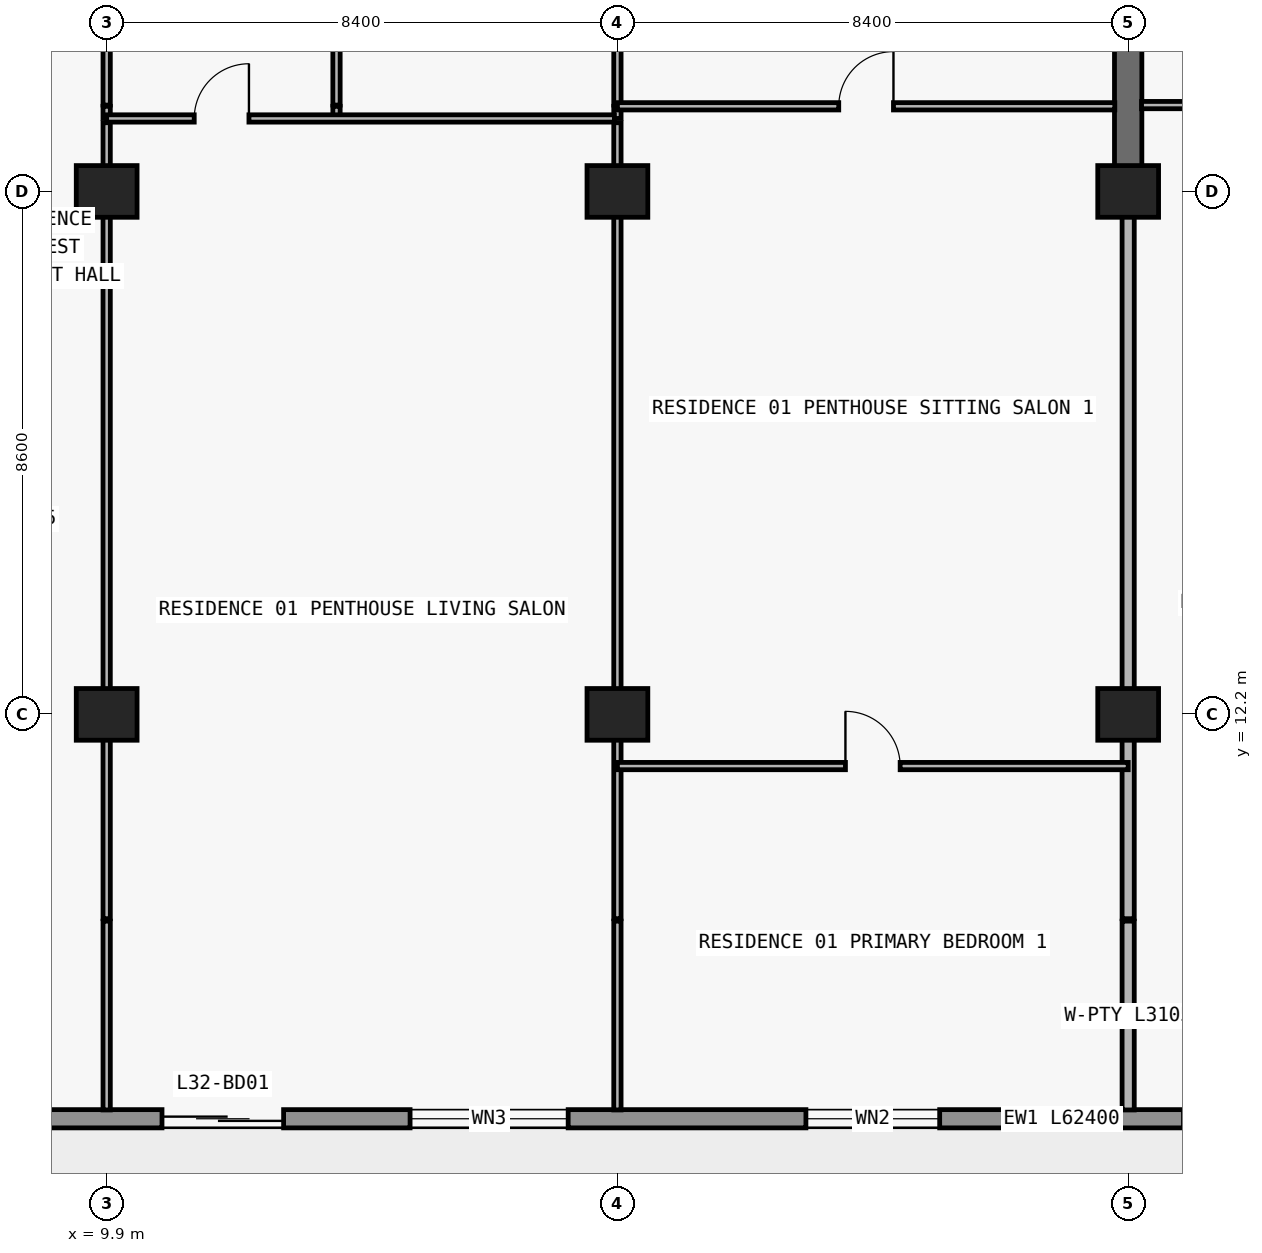
"""IFC4 building model, lengths in metres.
Left out: names, types, materials, properties, quantities, classifications, styles, units other than length and angle.
Written with IfcOpenShell. Run it as: python <this file> out.ifc"""

import sys

from ifc_helpers import new_model, si_unit, direction, frame, frame_2d, origin, origin_2d, place, context, subcontext, project, spatial, rectangle, extrude, element, fill, save


model = new_model("IFC4")
c1 = context("Model", 3, precision=1e-05, world=origin(), true_north=direction((0.0, 1.0)))
c2 = subcontext(c1, "Body", "Model", "MODEL_VIEW")
j1 = project(units=[si_unit("LENGTHUNIT", "METRE"), si_unit("PLANEANGLEUNIT", "RADIAN")], contexts=[c1])
p1 = place(None, origin())
s1 = spatial("IfcSite", under=j1, at=p1, CompositionType="ELEMENT")
p2 = place(p1, origin())
s2 = spatial("IfcBuilding", under=s1, at=p2, CompositionType="ELEMENT")
p3 = place(p2, frame((0.0, 0.0, 119.1)))
s3 = spatial("IfcBuildingStorey", under=s2, at=p3, CompositionType="ELEMENT", Elevation=119.1)
for number, where, z_axis, x_axis in (
    (1, (9.9, 12.2, 0.0), (0.0, 0.0, 1.0), (1.0, 0.0, 0.0)),
    (2, (18.3, 12.2, 0.0), (0.0, 0.0, 1.0), (1.0, 0.0, 0.0)),
    (3, (26.7, 12.2, 0.0), (0.0, 0.0, 1.0), (1.0, 0.0, 0.0)),
    (4, (9.9, 20.8, 0.0), (0.0, 0.0, 1.0), (1.0, 0.0, 0.0)),
    (5, (18.3, 20.8, 0.0), (0.0, 0.0, 1.0), (1.0, 0.0, 0.0)),
    (6, (26.7, 20.8, 0.0), (0.0, 0.0, 1.0), (1.0, 0.0, 0.0)),
):
    element("IfcColumn", number, at=place(p3, frame(where, z_axis=z_axis, x_axis=x_axis)), inside=s3, PredefinedType="COLUMN", context=c2, shape_type="SweptSolid", body=[
        extrude(rectangle(XDim=1.0, YDim=0.85, at=origin_2d()), origin(), (0.0, 0.0, 1.0), 3.05),
    ])
p4 = place(p3, frame((26.7, 20.8, 0.0), z_axis=(0.0, 0.0, 1.0), x_axis=(0.0, 1.0, 0.0)))
e7 = element("IfcWall", 7, at=p4, inside=s3, PredefinedType="SHEAR", context=c2, shape_type="SweptSolid", body=[
    extrude(rectangle(XDim=8.6, YDim=0.45, at=frame_2d((4.3, 0.0))), origin(), (0.0, 0.0, 1.0), 3.05),
])
p5 = place(p3, frame((70.1, 5.55, 0.0), z_axis=(0.0, 0.0, 1.0), x_axis=(-1.0, 0.0, 0.0)))
e8 = element("IfcWall", 8, at=p5, inside=s3, PredefinedType="STANDARD", context=c2, shape_type="SweptSolid", body=[
    extrude(rectangle(XDim=62.4, YDim=0.3, at=frame_2d((31.2, 0.0))), origin(), (0.0, 0.0, 1.0), 3.05),
])
p6 = place(p5, frame((57.29, 0.0, 0.0)))
e9 = element("IfcOpeningElement", 9, at=p6, cuts=e8, PredefinedType="OPENING", context=c2, shape_type="SweptSolid", body=[
    extrude(rectangle(XDim=2.0, YDim=2.3, at=frame_2d((1.0, 1.15))), frame((0.0, 0.16, 0.0), z_axis=(0.0, -1.0, 0.0), x_axis=(1.0, 0.0, 0.0)), (0.0, 0.0, 1.0), 0.32),
])
p7 = place(p5, frame((52.61, 0.0, 0.65)))
e10 = element("IfcOpeningElement", 10, at=p7, cuts=e8, PredefinedType="OPENING", context=c2, shape_type="SweptSolid", body=[
    extrude(rectangle(XDim=2.6, YDim=1.85, at=frame_2d((1.3, 0.925))), frame((0.0, 0.16, 0.0), z_axis=(0.0, -1.0, 0.0), x_axis=(1.0, 0.0, 0.0)), (0.0, 0.0, 1.0), 0.32),
])
p8 = place(p5, frame((46.5, 0.0, 0.85)))
e11 = element("IfcOpeningElement", 11, at=p8, cuts=e8, PredefinedType="OPENING", context=c2, shape_type="SweptSolid", body=[
    extrude(rectangle(XDim=2.2, YDim=1.55, at=frame_2d((1.1, 0.775))), frame((0.0, 0.16, 0.0), z_axis=(0.0, -1.0, 0.0), x_axis=(1.0, 0.0, 0.0)), (0.0, 0.0, 1.0), 0.32),
])
p9 = place(p5, frame((40.49, 0.0, 0.0)))
e12 = element("IfcOpeningElement", 12, at=p9, cuts=e8, PredefinedType="OPENING", context=c2, shape_type="SweptSolid", body=[
    extrude(rectangle(XDim=2.0, YDim=2.3, at=frame_2d((1.0, 1.15))), frame((0.0, 0.16, 0.0), z_axis=(0.0, -1.0, 0.0), x_axis=(1.0, 0.0, 0.0)), (0.0, 0.0, 1.0), 0.32),
])
p10 = place(p5, frame((35.81, 0.0, 0.65)))
e13 = element("IfcOpeningElement", 13, at=p10, cuts=e8, PredefinedType="OPENING", context=c2, shape_type="SweptSolid", body=[
    extrude(rectangle(XDim=2.6, YDim=1.85, at=frame_2d((1.3, 0.925))), frame((0.0, 0.16, 0.0), z_axis=(0.0, -1.0, 0.0), x_axis=(1.0, 0.0, 0.0)), (0.0, 0.0, 1.0), 0.32),
])
p11 = place(p5, frame((30.1, 0.0, 0.85)))
e14 = element("IfcOpeningElement", 14, at=p11, cuts=e8, PredefinedType="OPENING", context=c2, shape_type="SweptSolid", body=[
    extrude(rectangle(XDim=2.2, YDim=1.55, at=frame_2d((1.1, 0.775))), frame((0.0, 0.16, 0.0), z_axis=(0.0, -1.0, 0.0), x_axis=(1.0, 0.0, 0.0)), (0.0, 0.0, 1.0), 0.32),
])
p12 = place(p5, frame((24.426, 0.0, 0.0)))
e15 = element("IfcOpeningElement", 15, at=p12, cuts=e8, PredefinedType="OPENING", context=c2, shape_type="SweptSolid", body=[
    extrude(rectangle(XDim=2.0, YDim=2.3, at=frame_2d((1.0, 1.15))), frame((0.0, 0.16, 0.0), z_axis=(0.0, -1.0, 0.0), x_axis=(1.0, 0.0, 0.0)), (0.0, 0.0, 1.0), 0.32),
])
p13 = place(p5, frame((20.126, 0.0, 0.85)))
e16 = element("IfcOpeningElement", 16, at=p13, cuts=e8, PredefinedType="OPENING", context=c2, shape_type="SweptSolid", body=[
    extrude(rectangle(XDim=2.2, YDim=1.55, at=frame_2d((1.1, 0.775))), frame((0.0, 0.16, 0.0), z_axis=(0.0, -1.0, 0.0), x_axis=(1.0, 0.0, 0.0)), (0.0, 0.0, 1.0), 0.32),
])
p14 = place(p5, frame((15.69, 0.0, 0.0)))
e17 = element("IfcOpeningElement", 17, at=p14, cuts=e8, PredefinedType="OPENING", context=c2, shape_type="SweptSolid", body=[
    extrude(rectangle(XDim=2.0, YDim=2.3, at=frame_2d((1.0, 1.15))), frame((0.0, 0.16, 0.0), z_axis=(0.0, -1.0, 0.0), x_axis=(1.0, 0.0, 0.0)), (0.0, 0.0, 1.0), 0.32),
])
p15 = place(p5, frame((11.59, 0.0, 0.85)))
e18 = element("IfcOpeningElement", 18, at=p15, cuts=e8, PredefinedType="OPENING", context=c2, shape_type="SweptSolid", body=[
    extrude(rectangle(XDim=1.8, YDim=1.55, at=frame_2d((0.9, 0.775))), frame((0.0, 0.16, 0.0), z_axis=(0.0, -1.0, 0.0), x_axis=(1.0, 0.0, 0.0)), (0.0, 0.0, 1.0), 0.32),
])
p16 = place(p5, frame((7.626, 0.0, 0.0)))
e19 = element("IfcOpeningElement", 19, at=p16, cuts=e8, PredefinedType="OPENING", context=c2, shape_type="SweptSolid", body=[
    extrude(rectangle(XDim=2.0, YDim=2.3, at=frame_2d((1.0, 1.15))), frame((0.0, 0.16, 0.0), z_axis=(0.0, -1.0, 0.0), x_axis=(1.0, 0.0, 0.0)), (0.0, 0.0, 1.0), 0.32),
])
p17 = place(p5, frame((3.326, 0.0, 0.85)))
e20 = element("IfcOpeningElement", 20, at=p17, cuts=e8, PredefinedType="OPENING", context=c2, shape_type="SweptSolid", body=[
    extrude(rectangle(XDim=2.2, YDim=1.55, at=frame_2d((1.1, 0.775))), frame((0.0, 0.16, 0.0), z_axis=(0.0, -1.0, 0.0), x_axis=(1.0, 0.0, 0.0)), (0.0, 0.0, 1.0), 0.32),
])
p18 = place(p3, frame((9.9, 5.695, 0.0), z_axis=(0.0, 0.0, 1.0), x_axis=(0.0, 1.0, 0.0)))
e21 = element("IfcWall", 21, at=p18, inside=s3, PredefinedType="PARTITIONING", context=c2, shape_type="SweptSolid", body=[
    extrude(rectangle(XDim=3.105, YDim=0.12, at=frame_2d((1.552, 0.0))), origin(), (0.0, 0.0, 1.0), 3.05),
])
p19 = place(p3, frame((9.9, 8.84, 0.0), z_axis=(0.0, 0.0, 1.0), x_axis=(0.0, 1.0, 0.0)))
e22 = element("IfcWall", 22, at=p19, inside=s3, PredefinedType="PARTITIONING", context=c2, shape_type="SweptSolid", body=[
    extrude(rectangle(XDim=13.09, YDim=0.12, at=frame_2d((6.545, 0.0))), origin(), (0.0, 0.0, 1.0), 2.174),
])
p20 = place(p3, frame((9.9, 22.0, 0.0), z_axis=(0.0, 0.0, 1.0), x_axis=(0.0, 1.0, 0.0)))
e23 = element("IfcWall", 23, at=p20, inside=s3, PredefinedType="PARTITIONING", context=c2, shape_type="SweptSolid", body=[
    extrude(rectangle(XDim=0.2, YDim=0.12, at=frame_2d((0.1, 0.0))), origin(), (0.0, 0.0, 1.0), 2.174),
])
p21 = place(p3, frame((9.9, 22.22, 0.0), z_axis=(0.0, 0.0, 1.0), x_axis=(0.0, 1.0, 0.0)))
e24 = element("IfcWall", 24, at=p21, inside=s3, PredefinedType="PARTITIONING", context=c2, shape_type="SweptSolid", body=[
    extrude(rectangle(XDim=4.38, YDim=0.12, at=frame_2d((2.19, 0.0))), origin(), (0.0, 0.0, 1.0), 2.174),
])
p22 = place(p21, frame((1.74, 0.0, 0.0)))
e25 = element("IfcOpeningElement", 25, at=p22, cuts=e24, PredefinedType="OPENING", context=c2, shape_type="SweptSolid", body=[
    extrude(rectangle(XDim=0.9, YDim=2.124, at=frame_2d((0.45, 1.062))), frame((0.0, 0.07, 0.0), z_axis=(0.0, -1.0, 0.0), x_axis=(1.0, 0.0, 0.0)), (0.0, 0.0, 1.0), 0.14),
])
p23 = place(p3, frame((13.68, 22.0, 0.0), z_axis=(0.0, 0.0, 1.0), x_axis=(0.0, 1.0, 0.0)))
e26 = element("IfcWall", 26, at=p23, inside=s3, PredefinedType="PARTITIONING", context=c2, shape_type="SweptSolid", body=[
    extrude(rectangle(XDim=0.2, YDim=0.12, at=frame_2d((0.1, 0.0))), origin(), (0.0, 0.0, 1.0), 3.05),
])
p24 = place(p3, frame((13.68, 22.22, 0.0), z_axis=(0.0, 0.0, 1.0), x_axis=(0.0, 1.0, 0.0)))
e27 = element("IfcWall", 27, at=p24, inside=s3, PredefinedType="PARTITIONING", context=c2, shape_type="SweptSolid", body=[
    extrude(rectangle(XDim=4.38, YDim=0.12, at=frame_2d((2.19, 0.0))), origin(), (0.0, 0.0, 1.0), 3.05),
])
p25 = place(p24, frame((1.74, 0.0, 0.0)))
e28 = element("IfcOpeningElement", 28, at=p25, cuts=e27, PredefinedType="OPENING", context=c2, shape_type="SweptSolid", body=[
    extrude(rectangle(XDim=0.9, YDim=2.15, at=frame_2d((0.45, 1.075))), frame((0.0, 0.07, 0.0), z_axis=(0.0, -1.0, 0.0), x_axis=(1.0, 0.0, 0.0)), (0.0, 0.0, 1.0), 0.14),
])
p26 = place(p3, frame((18.3, 5.695, 0.0), z_axis=(0.0, 0.0, 1.0), x_axis=(0.0, 1.0, 0.0)))
e29 = element("IfcWall", 29, at=p26, inside=s3, PredefinedType="PARTITIONING", context=c2, shape_type="SweptSolid", body=[
    extrude(rectangle(XDim=3.105, YDim=0.12, at=frame_2d((1.552, 0.0))), origin(), (0.0, 0.0, 1.0), 3.05),
])
p27 = place(p3, frame((18.3, 8.84, 0.0), z_axis=(0.0, 0.0, 1.0), x_axis=(0.0, 1.0, 0.0)))
e30 = element("IfcWall", 30, at=p27, inside=s3, PredefinedType="PARTITIONING", context=c2, shape_type="SweptSolid", body=[
    extrude(rectangle(XDim=13.09, YDim=0.12, at=frame_2d((6.545, 0.0))), origin(), (0.0, 0.0, 1.0), 2.174),
])
p28 = place(p3, frame((18.3, 22.0, 0.0), z_axis=(0.0, 0.0, 1.0), x_axis=(0.0, 1.0, 0.0)))
e31 = element("IfcWall", 31, at=p28, inside=s3, PredefinedType="PARTITIONING", context=c2, shape_type="SweptSolid", body=[
    extrude(rectangle(XDim=0.2, YDim=0.12, at=frame_2d((0.1, 0.0))), origin(), (0.0, 0.0, 1.0), 2.174),
])
p29 = place(p3, frame((18.3, 22.22, 0.0), z_axis=(0.0, 0.0, 1.0), x_axis=(0.0, 1.0, 0.0)))
e32 = element("IfcWall", 32, at=p29, inside=s3, PredefinedType="PARTITIONING", context=c2, shape_type="SweptSolid", body=[
    extrude(rectangle(XDim=4.38, YDim=0.12, at=frame_2d((2.19, 0.0))), origin(), (0.0, 0.0, 1.0), 2.174),
])
p30 = place(p29, frame((1.74, 0.0, 0.0)))
e33 = element("IfcOpeningElement", 33, at=p30, cuts=e32, PredefinedType="OPENING", context=c2, shape_type="SweptSolid", body=[
    extrude(rectangle(XDim=0.9, YDim=2.124, at=frame_2d((0.45, 1.062))), frame((0.0, 0.07, 0.0), z_axis=(0.0, -1.0, 0.0), x_axis=(1.0, 0.0, 0.0)), (0.0, 0.0, 1.0), 0.14),
])
p31 = place(p3, frame((26.7, 5.695, 0.0), z_axis=(0.0, 0.0, 1.0), x_axis=(0.0, 1.0, 0.0)))
e34 = element("IfcWall", 34, at=p31, inside=s3, PredefinedType="PARTITIONING", context=c2, shape_type="SweptSolid", body=[
    extrude(rectangle(XDim=3.105, YDim=0.2, at=frame_2d((1.552, 0.0))), origin(), (0.0, 0.0, 1.0), 3.05),
])
p32 = place(p3, frame((26.7, 8.84, 0.0), z_axis=(0.0, 0.0, 1.0), x_axis=(0.0, 1.0, 0.0)))
e35 = element("IfcWall", 35, at=p32, inside=s3, PredefinedType="PARTITIONING", context=c2, shape_type="SweptSolid", body=[
    extrude(rectangle(XDim=11.955, YDim=0.2, at=frame_2d((5.978, 0.0))), origin(), (0.0, 0.0, 1.0), 2.174),
])
p33 = place(p3, frame((18.3, 11.35, 0.0), z_axis=(0.0, 0.0, 1.0), x_axis=(1.0, 0.0, 0.0)))
e36 = element("IfcWall", 36, at=p33, inside=s3, PredefinedType="PARTITIONING", context=c2, shape_type="SweptSolid", body=[
    extrude(rectangle(XDim=8.4, YDim=0.12, at=frame_2d((4.2, 0.0))), origin(), (0.0, 0.0, 1.0), 3.05),
])
p34 = place(p33, frame((3.75, 0.0, 0.0)))
e37 = element("IfcOpeningElement", 37, at=p34, cuts=e36, PredefinedType="OPENING", context=c2, shape_type="SweptSolid", body=[
    extrude(rectangle(XDim=0.9, YDim=2.15, at=frame_2d((0.45, 1.075))), frame((0.0, 0.07, 0.0), z_axis=(0.0, -1.0, 0.0), x_axis=(1.0, 0.0, 0.0)), (0.0, 0.0, 1.0), 0.14),
])
p35 = place(p3, frame((9.9, 22.0, 0.0), z_axis=(0.0, 0.0, 1.0), x_axis=(1.0, 0.0, 0.0)))
e38 = element("IfcWall", 38, at=p35, inside=s3, PredefinedType="PARTITIONING", context=c2, shape_type="SweptSolid", body=[
    extrude(rectangle(XDim=8.35, YDim=0.12, at=frame_2d((4.175, 0.0))), origin(), (0.0, 0.0, 1.0), 3.05),
])
p36 = place(p35, frame((1.44, 0.0, 0.0)))
e39 = element("IfcOpeningElement", 39, at=p36, cuts=e38, PredefinedType="OPENING", context=c2, shape_type="SweptSolid", body=[
    extrude(rectangle(XDim=0.9, YDim=2.15, at=frame_2d((0.45, 1.075))), frame((0.0, 0.07, 0.0), z_axis=(0.0, -1.0, 0.0), x_axis=(1.0, 0.0, 0.0)), (0.0, 0.0, 1.0), 0.14),
])
p37 = place(p3, frame((18.3, 22.2, 0.0), z_axis=(0.0, 0.0, 1.0), x_axis=(1.0, 0.0, 0.0)))
e40 = element("IfcWall", 40, at=p37, inside=s3, PredefinedType="PARTITIONING", context=c2, shape_type="SweptSolid", body=[
    extrude(rectangle(XDim=8.18, YDim=0.12, at=frame_2d((4.09, 0.0))), origin(), (0.0, 0.0, 1.0), 3.05),
])
p38 = place(p37, frame((3.64, 0.0, 0.0)))
e41 = element("IfcOpeningElement", 41, at=p38, cuts=e40, PredefinedType="OPENING", context=c2, shape_type="SweptSolid", body=[
    extrude(rectangle(XDim=0.9, YDim=2.15, at=frame_2d((0.45, 1.075))), frame((0.0, 0.07, 0.0), z_axis=(0.0, -1.0, 0.0), x_axis=(1.0, 0.0, 0.0)), (0.0, 0.0, 1.0), 0.14),
])
p39 = place(p3, frame((26.92, 22.22, 0.0), z_axis=(0.0, 0.0, 1.0), x_axis=(1.0, 0.0, 0.0)))
e42 = element("IfcWall", 42, at=p39, inside=s3, PredefinedType="PARTITIONING", context=c2, shape_type="SweptSolid", body=[
    extrude(rectangle(XDim=8.18, YDim=0.12, at=frame_2d((4.09, 0.0))), origin(), (0.0, 0.0, 1.0), 3.05),
])
p40 = place(p39, frame((1.204, 0.0, 0.0)))
e43 = element("IfcOpeningElement", 43, at=p40, cuts=e42, PredefinedType="OPENING", context=c2, shape_type="SweptSolid", body=[
    extrude(rectangle(XDim=0.9, YDim=2.15, at=frame_2d((0.45, 1.075))), frame((0.0, 0.07, 0.0), z_axis=(0.0, -1.0, 0.0), x_axis=(1.0, 0.0, 0.0)), (0.0, 0.0, 1.0), 0.14),
])
p41 = place(p6, origin())
e44 = element("IfcDoor", 44, at=p41, inside=s3, OperationType="DOUBLE_DOOR_SLIDING", PredefinedType="DOOR", context=c2, shape_type="SweptSolid", body=[
    extrude(rectangle(XDim=2.0, YDim=2.3, at=frame_2d((1.0, 1.15))), frame((0.0, 0.025, 0.0), z_axis=(0.0, -1.0, 0.0), x_axis=(1.0, 0.0, 0.0)), (0.0, 0.0, 1.0), 0.05),
])
fill(e9, e44)
p42 = place(p7, origin())
e45 = element("IfcWindow", 45, at=p42, inside=s3, PartitioningType="SINGLE_PANEL", PredefinedType="WINDOW", context=c2, shape_type="SweptSolid", body=[
    extrude(rectangle(XDim=2.6, YDim=1.85, at=frame_2d((1.3, 0.925))), frame((0.0, 0.03, 0.0), z_axis=(0.0, -1.0, 0.0), x_axis=(1.0, 0.0, 0.0)), (0.0, 0.0, 1.0), 0.06),
])
fill(e10, e45)
p43 = place(p8, origin())
e46 = element("IfcWindow", 46, at=p43, inside=s3, PartitioningType="SINGLE_PANEL", PredefinedType="WINDOW", context=c2, shape_type="SweptSolid", body=[
    extrude(rectangle(XDim=2.2, YDim=1.55, at=frame_2d((1.1, 0.775))), frame((0.0, 0.03, 0.0), z_axis=(0.0, -1.0, 0.0), x_axis=(1.0, 0.0, 0.0)), (0.0, 0.0, 1.0), 0.06),
])
fill(e11, e46)
p44 = place(p36, origin())
e47 = element("IfcDoor", 47, at=p44, inside=s3, OperationType="SINGLE_SWING_RIGHT", PredefinedType="DOOR", context=c2, shape_type="SweptSolid", body=[
    extrude(rectangle(XDim=0.9, YDim=2.15, at=frame_2d((0.45, 1.075))), frame((0.0, 0.025, 0.0), z_axis=(0.0, -1.0, 0.0), x_axis=(1.0, 0.0, 0.0)), (0.0, 0.0, 1.0), 0.05),
])
fill(e39, e47)
p45 = place(p38, origin())
e48 = element("IfcDoor", 48, at=p45, inside=s3, OperationType="SINGLE_SWING_RIGHT", PredefinedType="DOOR", context=c2, shape_type="SweptSolid", body=[
    extrude(rectangle(XDim=0.9, YDim=2.15, at=frame_2d((0.45, 1.075))), frame((0.0, 0.025, 0.0), z_axis=(0.0, -1.0, 0.0), x_axis=(1.0, 0.0, 0.0)), (0.0, 0.0, 1.0), 0.05),
])
fill(e41, e48)
p46 = place(p34, origin())
e49 = element("IfcDoor", 49, at=p46, inside=s3, OperationType="SINGLE_SWING_LEFT", PredefinedType="DOOR", context=c2, shape_type="SweptSolid", body=[
    extrude(rectangle(XDim=0.9, YDim=2.15, at=frame_2d((0.45, 1.075))), frame((0.0, 0.025, 0.0), z_axis=(0.0, -1.0, 0.0), x_axis=(1.0, 0.0, 0.0)), (0.0, 0.0, 1.0), 0.05),
])
fill(e37, e49)
save(model, sys.argv[1])
